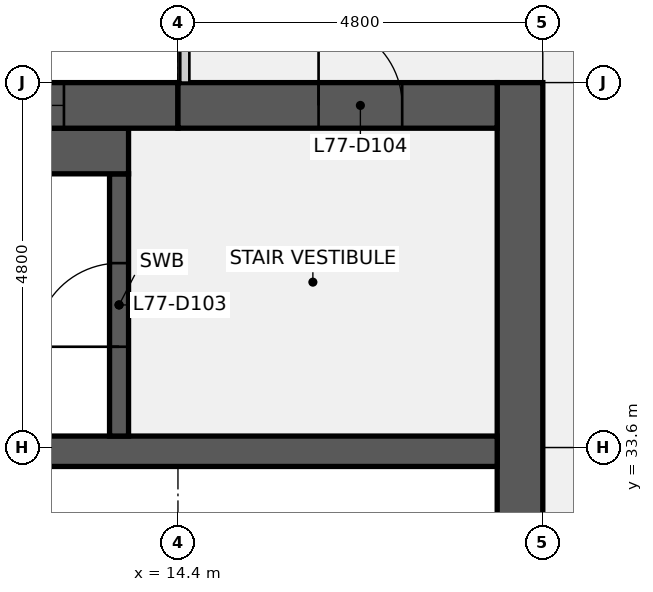
"""IFC4 building model, lengths in metres.
Left out: names, types, materials, properties, quantities, classifications, styles, units other than length and angle.
Written with IfcOpenShell. Run it as: python <this file> out.ifc"""

import sys

from ifc_helpers import new_model, si_unit, direction, frame, frame_2d, origin, place, context, subcontext, project, spatial, rectangle, extrude, element, fill, save


model = new_model("IFC4")
c1 = context("Model", 3, precision=1e-05, world=origin(), true_north=direction((0.0, 1.0)))
c2 = subcontext(c1, "Body", "Model", "MODEL_VIEW")
j1 = project(units=[si_unit("LENGTHUNIT", "METRE"), si_unit("PLANEANGLEUNIT", "RADIAN")], contexts=[c1])
p1 = place(None, origin())
s1 = spatial("IfcSite", under=j1, at=p1, CompositionType="ELEMENT")
p2 = place(p1, origin())
s2 = spatial("IfcBuilding", under=s1, at=p2, CompositionType="ELEMENT")
p3 = place(p2, frame((0.0, 0.0, 346.3)))
s3 = spatial("IfcBuildingStorey", under=s2, at=p3, CompositionType="ELEMENT", Elevation=346.3)
p4 = place(p3, frame((18.9, 38.4, 0.0), z_axis=(0.0, 0.0, 1.0), x_axis=(0.0, -1.0, 0.0)))
e1 = element("IfcWall", 1, at=p4, inside=s3, PredefinedType="SHEAR", context=c2, shape_type="SweptSolid", body=[
    extrude(rectangle(XDim=28.8, YDim=0.6, at=frame_2d((14.4, 0.0))), origin(), (0.0, 0.0, 1.0), 3.84),
])
p5 = place(p4, frame((18.3, 0.0, 0.0)))
e2 = element("IfcOpeningElement", 2, at=p5, cuts=e1, PredefinedType="OPENING", context=c2, shape_type="SweptSolid", body=[
    extrude(rectangle(XDim=1.8, YDim=2.1, at=frame_2d((0.9, 1.05))), frame((0.0, 0.31, 0.0), z_axis=(0.0, -1.0, 0.0), x_axis=(1.0, 0.0, 0.0)), (0.0, 0.0, 1.0), 0.62),
])
p6 = place(p4, frame((8.7, 0.0, 0.0)))
e3 = element("IfcOpeningElement", 3, at=p6, cuts=e1, PredefinedType="OPENING", context=c2, shape_type="SweptSolid", body=[
    extrude(rectangle(XDim=1.8, YDim=2.1, at=frame_2d((0.9, 1.05))), frame((0.0, 0.31, 0.0), z_axis=(0.0, -1.0, 0.0), x_axis=(1.0, 0.0, 0.0)), (0.0, 0.0, 1.0), 0.62),
])
p7 = place(p3, frame((0.6, 33.55, 0.0), z_axis=(0.0, 0.0, 1.0), x_axis=(1.0, 0.0, 0.0)))
e4 = element("IfcWall", 4, at=p7, inside=s3, PredefinedType="SHEAR", context=c2, shape_type="SweptSolid", body=[
    extrude(rectangle(XDim=18.0, YDim=0.4, at=frame_2d((9.0, 0.0))), origin(), (0.0, 0.0, 1.0), 3.84),
])
p8 = place(p3, frame((13.625, 33.75, 0.0), z_axis=(0.0, 0.0, 1.0), x_axis=(0.0, 1.0, 0.0)))
e5 = element("IfcWall", 5, at=p8, inside=s3, PredefinedType="SHEAR", context=c2, shape_type="SweptSolid", body=[
    extrude(rectangle(XDim=3.45, YDim=0.25, at=frame_2d((1.725, 0.0))), origin(), (0.0, 0.0, 1.0), 3.84),
])
p9 = place(p8, frame((1.175, 0.0, 0.0)))
e6 = element("IfcOpeningElement", 6, at=p9, cuts=e5, PredefinedType="OPENING", context=c2, shape_type="SweptSolid", body=[
    extrude(rectangle(XDim=1.1, YDim=2.1, at=frame_2d((0.55, 1.05))), frame((0.0, 0.135, 0.0), z_axis=(0.0, -1.0, 0.0), x_axis=(1.0, 0.0, 0.0)), (0.0, 0.0, 1.0), 0.27),
])
p10 = place(p3, frame((6.25, 37.5, 0.0), z_axis=(0.0, 0.0, 1.0), x_axis=(1.0, 0.0, 0.0)))
e7 = element("IfcWall", 7, at=p10, inside=s3, PredefinedType="SHEAR", context=c2, shape_type="SweptSolid", body=[
    extrude(rectangle(XDim=7.5, YDim=0.6, at=frame_2d((3.75, 0.0))), origin(), (0.0, 0.0, 1.0), 3.84),
])
p11 = place(p3, frame((0.6, 38.1, 0.0), z_axis=(0.0, 0.0, 1.0), x_axis=(1.0, 0.0, 0.0)))
e8 = element("IfcWall", 8, at=p11, inside=s3, PredefinedType="SHEAR", context=c2, shape_type="SweptSolid", body=[
    extrude(rectangle(XDim=13.8, YDim=0.6, at=frame_2d((6.9, 0.0))), origin(), (0.0, 0.0, 1.0), 3.84),
])
p12 = place(p11, frame((5.7, 0.0, 0.9)))
e9 = element("IfcOpeningElement", 9, at=p12, cuts=e8, PredefinedType="OPENING", context=c2, shape_type="SweptSolid", body=[
    extrude(rectangle(XDim=1.8, YDim=1.5, at=frame_2d((0.9, 0.75))), frame((0.0, 0.31, 0.0), z_axis=(0.0, -1.0, 0.0), x_axis=(1.0, 0.0, 0.0)), (0.0, 0.0, 1.0), 0.62),
])
p13 = place(p11, frame((10.5, 0.0, 0.9)))
e10 = element("IfcOpeningElement", 10, at=p13, cuts=e8, PredefinedType="OPENING", context=c2, shape_type="SweptSolid", body=[
    extrude(rectangle(XDim=1.8, YDim=1.5, at=frame_2d((0.9, 0.75))), frame((0.0, 0.31, 0.0), z_axis=(0.0, -1.0, 0.0), x_axis=(1.0, 0.0, 0.0)), (0.0, 0.0, 1.0), 0.62),
])
p14 = place(p3, frame((14.4, 38.1, 0.0), z_axis=(0.0, 0.0, 1.0), x_axis=(1.0, 0.0, 0.0)))
e11 = element("IfcWall", 11, at=p14, inside=s3, PredefinedType="SHEAR", context=c2, shape_type="SweptSolid", body=[
    extrude(rectangle(XDim=4.2, YDim=0.6, at=frame_2d((2.1, 0.0))), origin(), (0.0, 0.0, 1.0), 3.84),
])
p15 = place(p14, frame((1.85, 0.0, 0.0)))
e12 = element("IfcOpeningElement", 12, at=p15, cuts=e11, PredefinedType="OPENING", context=c2, shape_type="SweptSolid", body=[
    extrude(rectangle(XDim=1.1, YDim=2.1, at=frame_2d((0.55, 1.05))), frame((0.0, 0.31, 0.0), z_axis=(0.0, -1.0, 0.0), x_axis=(1.0, 0.0, 0.0)), (0.0, 0.0, 1.0), 0.62),
])
p16 = place(p9, origin())
e13 = element("IfcDoor", 13, at=p16, inside=s3, OperationType="SINGLE_SWING_LEFT", PredefinedType="DOOR", context=c2, shape_type="SweptSolid", body=[
    extrude(rectangle(XDim=1.1, YDim=2.1, at=frame_2d((0.55, 1.05))), frame((0.0, 0.025, 0.0), z_axis=(0.0, -1.0, 0.0), x_axis=(1.0, 0.0, 0.0)), (0.0, 0.0, 1.0), 0.05),
])
fill(e6, e13)
p17 = place(p15, origin())
e14 = element("IfcDoor", 14, at=p17, inside=s3, OperationType="SINGLE_SWING_LEFT", PredefinedType="DOOR", context=c2, shape_type="SweptSolid", body=[
    extrude(rectangle(XDim=1.1, YDim=2.1, at=frame_2d((0.55, 1.05))), frame((0.0, 0.025, 0.0), z_axis=(0.0, -1.0, 0.0), x_axis=(1.0, 0.0, 0.0)), (0.0, 0.0, 1.0), 0.05),
])
fill(e12, e14)
p18 = place(p13, origin())
e15 = element("IfcWindow", 15, at=p18, inside=s3, PartitioningType="SINGLE_PANEL", PredefinedType="WINDOW", context=c2, shape_type="SweptSolid", body=[
    extrude(rectangle(XDim=1.8, YDim=1.5, at=frame_2d((0.9, 0.75))), frame((0.0, 0.03, 0.0), z_axis=(0.0, -1.0, 0.0), x_axis=(1.0, 0.0, 0.0)), (0.0, 0.0, 1.0), 0.06),
])
fill(e10, e15)
save(model, sys.argv[1])
